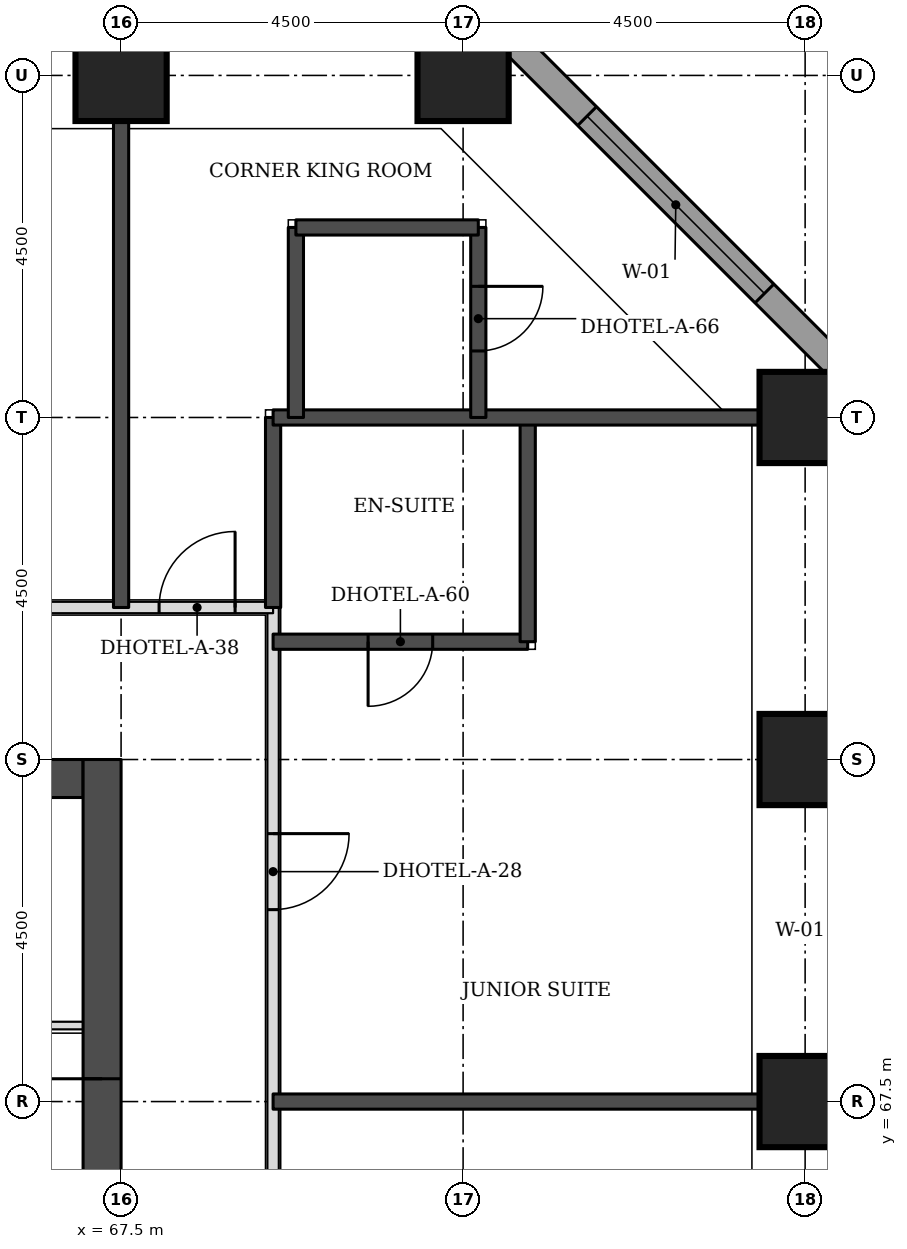
"""IFC4 building model, lengths in metres.
Left out: names, types, materials, properties, quantities, classifications, styles, units other than length and angle.
Written with IfcOpenShell. Run it as: python <this file> out.ifc"""

import sys

from ifc_helpers import new_model, si_unit, direction, frame, frame_2d, origin, origin_2d, place, context, subcontext, project, spatial, rectangle, extrude, element, fill, save


model = new_model("IFC4")
c1 = context("Model", 3, precision=1e-05, world=origin(), true_north=direction((0.0, 1.0)))
c2 = subcontext(c1, "Body", "Model", "MODEL_VIEW")
j1 = project(units=[si_unit("LENGTHUNIT", "METRE"), si_unit("PLANEANGLEUNIT", "RADIAN")], contexts=[c1])
p1 = place(None, origin())
s1 = spatial("IfcSite", under=j1, at=p1, CompositionType="ELEMENT")
p2 = place(p1, origin())
s2 = spatial("IfcBuilding", under=s1, at=p2, CompositionType="ELEMENT")
p3 = place(p2, frame((0.0, 0.0, 49.5)))
s3 = spatial("IfcBuildingStorey", under=s2, at=p3, CompositionType="ELEMENT", Elevation=49.5)
for number, where, z_axis, x_axis in (
    (1, (76.5, 67.5, 0.0), (0.0, 0.0, 1.0), (1.0, 0.0, 0.0)),
    (2, (76.5, 72.0, 0.0), (0.0, 0.0, 1.0), (1.0, 0.0, 0.0)),
    (3, (76.5, 76.5, 0.0), (0.0, 0.0, 1.0), (1.0, 0.0, 0.0)),
    (4, (67.5, 81.0, 0.0), (0.0, 0.0, 1.0), (1.0, 0.0, 0.0)),
    (5, (72.0, 81.0, 0.0), (0.0, 0.0, 1.0), (1.0, 0.0, 0.0)),
):
    element("IfcColumn", number, at=place(p3, frame(where, z_axis=z_axis, x_axis=x_axis)), inside=s3, PredefinedType="COLUMN", context=c2, shape_type="SweptSolid", body=[
        extrude(rectangle(XDim=1.2, YDim=1.2, at=origin_2d()), origin(), (0.0, 0.0, 1.0), 3.3),
    ])
p4 = place(p3, frame((45.5, 71.75, 0.0), z_axis=(0.0, 0.0, 1.0), x_axis=(1.0, 0.0, 0.0)))
e6 = element("IfcWall", 6, at=p4, inside=s3, PredefinedType="SHEAR", context=c2, shape_type="SweptSolid", body=[
    extrude(rectangle(XDim=21.5, YDim=0.5, at=frame_2d((10.75, 0.0))), origin(), (0.0, 0.0, 1.0), 3.3),
])
p5 = place(p3, frame((67.25, 49.5, 0.0), z_axis=(0.0, 0.0, 1.0), x_axis=(0.0, 1.0, 0.0)))
e7 = element("IfcWall", 7, at=p5, inside=s3, PredefinedType="SHEAR", context=c2, shape_type="SweptSolid", body=[
    extrude(rectangle(XDim=22.5, YDim=0.5, at=frame_2d((11.25, 0.0))), origin(), (0.0, 0.0, 1.0), 3.3),
])
p6 = place(p5, frame((4.2, 0.0, 0.0)))
e8 = element("IfcOpeningElement", 8, at=p6, cuts=e7, PredefinedType="OPENING", context=c2, shape_type="SweptSolid", body=[
    extrude(rectangle(XDim=1.8, YDim=2.1, at=frame_2d((0.9, 1.05))), frame((0.0, 0.26, 0.0), z_axis=(0.0, -1.0, 0.0), x_axis=(1.0, 0.0, 0.0)), (0.0, 0.0, 1.0), 0.52),
])
p7 = place(p5, frame((6.9, 0.0, 0.0)))
e9 = element("IfcOpeningElement", 9, at=p7, cuts=e7, PredefinedType="OPENING", context=c2, shape_type="SweptSolid", body=[
    extrude(rectangle(XDim=1.1, YDim=2.1, at=frame_2d((0.55, 1.05))), frame((0.0, 0.26, 0.0), z_axis=(0.0, -1.0, 0.0), x_axis=(1.0, 0.0, 0.0)), (0.0, 0.0, 1.0), 0.52),
])
p8 = place(p5, frame((13.6, 0.0, 0.0)))
e10 = element("IfcOpeningElement", 10, at=p8, cuts=e7, PredefinedType="OPENING", context=c2, shape_type="SweptSolid", body=[
    extrude(rectangle(XDim=1.1, YDim=2.1, at=frame_2d((0.55, 1.05))), frame((0.0, 0.26, 0.0), z_axis=(0.0, -1.0, 0.0), x_axis=(1.0, 0.0, 0.0)), (0.0, 0.0, 1.0), 0.52),
])
p9 = place(p5, frame((16.5, 0.0, 0.0)))
e11 = element("IfcOpeningElement", 11, at=p9, cuts=e7, PredefinedType="OPENING", context=c2, shape_type="SweptSolid", body=[
    extrude(rectangle(XDim=1.8, YDim=2.1, at=frame_2d((0.9, 1.05))), frame((0.0, 0.26, 0.0), z_axis=(0.0, -1.0, 0.0), x_axis=(1.0, 0.0, 0.0)), (0.0, 0.0, 1.0), 0.52),
])
p10 = place(p3, frame((77.326, 76.77, 0.0), z_axis=(0.0, 0.0, 1.0), x_axis=(-0.707106781187, 0.707106781187, 0.0)))
e12 = element("IfcWall", 12, at=p10, inside=s3, PredefinedType="STANDARD", context=c2, shape_type="SweptSolid", body=[
    extrude(rectangle(XDim=7.151, YDim=0.35, at=frame_2d((3.576, 0.0))), origin(), (0.0, 0.0, 1.0), 3.055),
])
p11 = place(p10, frame((1.926, 0.0, 0.8)))
e13 = element("IfcOpeningElement", 13, at=p11, cuts=e12, PredefinedType="OPENING", context=c2, shape_type="SweptSolid", body=[
    extrude(rectangle(XDim=3.3, YDim=1.5, at=frame_2d((1.65, 0.75))), frame((0.0, 0.185, 0.0), z_axis=(0.0, -1.0, 0.0), x_axis=(1.0, 0.0, 0.0)), (0.0, 0.0, 1.0), 0.37),
])
p12 = place(p3, frame((69.5, 47.5, 0.0), z_axis=(0.0, 0.0, 1.0), x_axis=(0.0, 1.0, 0.0)))
e14 = element("IfcWall", 14, at=p12, inside=s3, PredefinedType="PARTITIONING", context=c2, shape_type="SweptSolid", body=[
    extrude(rectangle(XDim=26.5, YDim=0.15, at=frame_2d((13.25, 0.0))), origin(), (0.0, 0.0, 1.0), 3.08),
])
p13 = place(p12, frame((22.525, 0.0, 0.0)))
e15 = element("IfcOpeningElement", 15, at=p13, cuts=e14, PredefinedType="OPENING", context=c2, shape_type="SweptSolid", body=[
    extrude(rectangle(XDim=1.0, YDim=2.1, at=frame_2d((0.5, 1.05))), frame((0.0, 0.085, 0.0), z_axis=(0.0, -1.0, 0.0), x_axis=(1.0, 0.0, 0.0)), (0.0, 0.0, 1.0), 0.17),
])
p14 = place(p12, frame((16.225, 0.0, 0.0)))
e16 = element("IfcOpeningElement", 16, at=p14, cuts=e14, PredefinedType="OPENING", context=c2, shape_type="SweptSolid", body=[
    extrude(rectangle(XDim=1.0, YDim=2.1, at=frame_2d((0.5, 1.05))), frame((0.0, 0.085, 0.0), z_axis=(0.0, -1.0, 0.0), x_axis=(1.0, 0.0, 0.0)), (0.0, 0.0, 1.0), 0.17),
])
p15 = place(p12, frame((4.25, 0.0, 0.0)))
e17 = element("IfcOpeningElement", 17, at=p15, cuts=e14, PredefinedType="OPENING", context=c2, shape_type="SweptSolid", body=[
    extrude(rectangle(XDim=1.1, YDim=2.1, at=frame_2d((0.55, 1.05))), frame((0.0, 0.085, 0.0), z_axis=(0.0, -1.0, 0.0), x_axis=(1.0, 0.0, 0.0)), (0.0, 0.0, 1.0), 0.17),
])
p16 = place(p12, frame((0.447, 0.0, 0.0)))
e18 = element("IfcOpeningElement", 18, at=p16, cuts=e14, PredefinedType="OPENING", context=c2, shape_type="SweptSolid", body=[
    extrude(rectangle(XDim=1.0, YDim=2.1, at=frame_2d((0.5, 1.05))), frame((0.0, 0.085, 0.0), z_axis=(0.0, -1.0, 0.0), x_axis=(1.0, 0.0, 0.0)), (0.0, 0.0, 1.0), 0.17),
])
p17 = place(p3, frame((43.0, 74.0, 0.0), z_axis=(0.0, 0.0, 1.0), x_axis=(1.0, 0.0, 0.0)))
e19 = element("IfcWall", 19, at=p17, inside=s3, PredefinedType="PARTITIONING", context=c2, shape_type="SweptSolid", body=[
    extrude(rectangle(XDim=26.5, YDim=0.15, at=frame_2d((13.25, 0.0))), origin(), (0.0, 0.0, 1.0), 3.08),
])
p18 = place(p17, frame((4.675, 0.0, 0.0)))
e20 = element("IfcOpeningElement", 20, at=p18, cuts=e19, PredefinedType="OPENING", context=c2, shape_type="SweptSolid", body=[
    extrude(rectangle(XDim=1.0, YDim=2.1, at=frame_2d((0.5, 1.05))), frame((0.0, 0.085, 0.0), z_axis=(0.0, -1.0, 0.0), x_axis=(1.0, 0.0, 0.0)), (0.0, 0.0, 1.0), 0.17),
])
p19 = place(p17, frame((9.025, 0.0, 0.0)))
e21 = element("IfcOpeningElement", 21, at=p19, cuts=e19, PredefinedType="OPENING", context=c2, shape_type="SweptSolid", body=[
    extrude(rectangle(XDim=1.0, YDim=2.1, at=frame_2d((0.5, 1.05))), frame((0.0, 0.085, 0.0), z_axis=(0.0, -1.0, 0.0), x_axis=(1.0, 0.0, 0.0)), (0.0, 0.0, 1.0), 0.17),
])
p20 = place(p17, frame((20.725, 0.0, 0.0)))
e22 = element("IfcOpeningElement", 22, at=p20, cuts=e19, PredefinedType="OPENING", context=c2, shape_type="SweptSolid", body=[
    extrude(rectangle(XDim=1.0, YDim=2.1, at=frame_2d((0.5, 1.05))), frame((0.0, 0.085, 0.0), z_axis=(0.0, -1.0, 0.0), x_axis=(1.0, 0.0, 0.0)), (0.0, 0.0, 1.0), 0.17),
])
p21 = place(p17, frame((0.5, 0.0, 0.0)))
e23 = element("IfcOpeningElement", 23, at=p21, cuts=e19, PredefinedType="OPENING", context=c2, shape_type="SweptSolid", body=[
    extrude(rectangle(XDim=1.0, YDim=2.1, at=frame_2d((0.5, 1.05))), frame((0.0, 0.085, 0.0), z_axis=(0.0, -1.0, 0.0), x_axis=(1.0, 0.0, 0.0)), (0.0, 0.0, 1.0), 0.17),
])
p22 = place(p17, frame((25.0, 0.0, 0.0)))
e24 = element("IfcOpeningElement", 24, at=p22, cuts=e19, PredefinedType="OPENING", context=c2, shape_type="SweptSolid", body=[
    extrude(rectangle(XDim=1.0, YDim=2.1, at=frame_2d((0.5, 1.05))), frame((0.0, 0.085, 0.0), z_axis=(0.0, -1.0, 0.0), x_axis=(1.0, 0.0, 0.0)), (0.0, 0.0, 1.0), 0.17),
])
p23 = place(p3, frame((69.5, 67.5, 0.0), z_axis=(0.0, 0.0, 1.0), x_axis=(1.0, 0.0, 0.0)))
e25 = element("IfcWall", 25, at=p23, inside=s3, PredefinedType="SOLIDWALL", context=c2, shape_type="SweptSolid", body=[
    extrude(rectangle(XDim=6.4, YDim=0.2, at=frame_2d((3.2, 0.0))), origin(), (0.0, 0.0, 1.0), 3.08),
])
p24 = place(p3, frame((69.5, 73.55, 0.0), z_axis=(0.0, 0.0, 1.0), x_axis=(1.0, 0.0, 0.0)))
e26 = element("IfcWall", 26, at=p24, inside=s3, PredefinedType="SOLIDWALL", context=c2, shape_type="SweptSolid", body=[
    extrude(rectangle(XDim=3.35, YDim=0.2, at=frame_2d((1.675, 0.0))), origin(), (0.0, 0.0, 1.0), 3.08),
])
p25 = place(p24, frame((1.25, 0.0, 0.0)))
e27 = element("IfcOpeningElement", 27, at=p25, cuts=e26, PredefinedType="OPENING", context=c2, shape_type="SweptSolid", body=[
    extrude(rectangle(XDim=0.85, YDim=2.1, at=frame_2d((0.425, 1.05))), frame((0.0, 0.11, 0.0), z_axis=(0.0, -1.0, 0.0), x_axis=(1.0, 0.0, 0.0)), (0.0, 0.0, 1.0), 0.22),
])
p26 = place(p3, frame((72.85, 73.55, 0.0), z_axis=(0.0, 0.0, 1.0), x_axis=(0.0, 1.0, 0.0)))
e28 = element("IfcWall", 28, at=p26, inside=s3, PredefinedType="SOLIDWALL", context=c2, shape_type="SweptSolid", body=[
    extrude(rectangle(XDim=2.95, YDim=0.2, at=frame_2d((1.475, 0.0))), origin(), (0.0, 0.0, 1.0), 3.08),
])
p27 = place(p3, frame((67.5, 74.0, 0.0), z_axis=(0.0, 0.0, 1.0), x_axis=(0.0, 1.0, 0.0)))
e29 = element("IfcWall", 29, at=p27, inside=s3, PredefinedType="SOLIDWALL", context=c2, shape_type="SweptSolid", body=[
    extrude(rectangle(XDim=6.4, YDim=0.2, at=frame_2d((3.2, 0.0))), origin(), (0.0, 0.0, 1.0), 3.08),
])
p28 = place(p3, frame((69.5, 74.0, 0.0), z_axis=(0.0, 0.0, 1.0), x_axis=(0.0, 1.0, 0.0)))
e30 = element("IfcWall", 30, at=p28, inside=s3, PredefinedType="SOLIDWALL", context=c2, shape_type="SweptSolid", body=[
    extrude(rectangle(XDim=2.5, YDim=0.2, at=frame_2d((1.25, 0.0))), origin(), (0.0, 0.0, 1.0), 3.08),
])
p29 = place(p3, frame((69.5, 76.5, 0.0), z_axis=(0.0, 0.0, 1.0), x_axis=(1.0, 0.0, 0.0)))
e31 = element("IfcWall", 31, at=p29, inside=s3, PredefinedType="SOLIDWALL", context=c2, shape_type="SweptSolid", body=[
    extrude(rectangle(XDim=6.4, YDim=0.2, at=frame_2d((3.2, 0.0))), origin(), (0.0, 0.0, 1.0), 3.08),
])
p30 = place(p3, frame((69.8, 76.5, 0.0), z_axis=(0.0, 0.0, 1.0), x_axis=(0.0, 1.0, 0.0)))
e32 = element("IfcWall", 32, at=p30, inside=s3, PredefinedType="SOLIDWALL", context=c2, shape_type="SweptSolid", body=[
    extrude(rectangle(XDim=2.5, YDim=0.2, at=frame_2d((1.25, 0.0))), origin(), (0.0, 0.0, 1.0), 3.08),
])
p31 = place(p3, frame((72.2, 76.5, 0.0), z_axis=(0.0, 0.0, 1.0), x_axis=(0.0, 1.0, 0.0)))
e33 = element("IfcWall", 33, at=p31, inside=s3, PredefinedType="SOLIDWALL", context=c2, shape_type="SweptSolid", body=[
    extrude(rectangle(XDim=2.5, YDim=0.2, at=frame_2d((1.25, 0.0))), origin(), (0.0, 0.0, 1.0), 3.08),
])
p32 = place(p31, frame((0.875, 0.0, 0.0)))
e34 = element("IfcOpeningElement", 34, at=p32, cuts=e33, PredefinedType="OPENING", context=c2, shape_type="SweptSolid", body=[
    extrude(rectangle(XDim=0.85, YDim=2.1, at=frame_2d((0.425, 1.05))), frame((0.0, 0.11, 0.0), z_axis=(0.0, -1.0, 0.0), x_axis=(1.0, 0.0, 0.0)), (0.0, 0.0, 1.0), 0.22),
])
p33 = place(p3, frame((69.8, 79.0, 0.0), z_axis=(0.0, 0.0, 1.0), x_axis=(1.0, 0.0, 0.0)))
e35 = element("IfcWall", 35, at=p33, inside=s3, PredefinedType="SOLIDWALL", context=c2, shape_type="SweptSolid", body=[
    extrude(rectangle(XDim=2.4, YDim=0.2, at=frame_2d((1.2, 0.0))), origin(), (0.0, 0.0, 1.0), 3.08),
])
p34 = place(p3, frame((61.85, 68.5, 0.0), z_axis=(0.0, 0.0, 1.0), x_axis=(1.0, 0.0, 0.0)))
e36 = element("IfcWall", 36, at=p34, inside=s3, PredefinedType="PARTITIONING", context=c2, shape_type="SweptSolid", body=[
    extrude(rectangle(XDim=5.15, YDim=0.1, at=frame_2d((2.575, 0.0))), origin(), (0.0, 0.0, 1.0), 3.08),
])
p35 = place(p34, frame((3.413, 0.0, 0.0)))
e37 = element("IfcOpeningElement", 37, at=p35, cuts=e36, PredefinedType="OPENING", context=c2, shape_type="SweptSolid", body=[
    extrude(rectangle(XDim=0.9, YDim=2.1, at=frame_2d((0.45, 1.05))), frame((0.0, 0.06, 0.0), z_axis=(0.0, -1.0, 0.0), x_axis=(1.0, 0.0, 0.0)), (0.0, 0.0, 1.0), 0.12),
])
p36 = place(p34, frame((0.837, 0.0, 0.0)))
e38 = element("IfcOpeningElement", 38, at=p36, cuts=e36, PredefinedType="OPENING", context=c2, shape_type="SweptSolid", body=[
    extrude(rectangle(XDim=0.9, YDim=2.1, at=frame_2d((0.45, 1.05))), frame((0.0, 0.06, 0.0), z_axis=(0.0, -1.0, 0.0), x_axis=(1.0, 0.0, 0.0)), (0.0, 0.0, 1.0), 0.12),
])
p37 = place(p11, origin())
e39 = element("IfcWindow", 39, at=p37, inside=s3, PartitioningType="SINGLE_PANEL", PredefinedType="WINDOW", context=c2, shape_type="SweptSolid", body=[
    extrude(rectangle(XDim=3.3, YDim=1.5, at=frame_2d((1.65, 0.75))), frame((0.0, 0.085, 0.0), z_axis=(0.0, -1.0, 0.0), x_axis=(1.0, 0.0, 0.0)), (0.0, 0.0, 1.0), 0.06),
])
fill(e13, e39)
p38 = place(p13, frame((1.0, 0.0, 0.0), z_axis=(0.0, 0.0, 1.0), x_axis=(-1.0, 0.0, 0.0)))
e40 = element("IfcDoor", 40, at=p38, inside=s3, OperationType="SINGLE_SWING_LEFT", PredefinedType="DOOR", context=c2, shape_type="SweptSolid", body=[
    extrude(rectangle(XDim=1.0, YDim=2.1, at=frame_2d((0.5, 1.05))), frame((0.0, 0.025, 0.0), z_axis=(0.0, -1.0, 0.0), x_axis=(1.0, 0.0, 0.0)), (0.0, 0.0, 1.0), 0.05),
])
fill(e15, e40)
p39 = place(p25, frame((0.85, 0.0, 0.0), z_axis=(0.0, 0.0, 1.0), x_axis=(-1.0, 0.0, 0.0)))
e41 = element("IfcDoor", 41, at=p39, inside=s3, OperationType="SINGLE_SWING_RIGHT", PredefinedType="DOOR", context=c2, shape_type="SweptSolid", body=[
    extrude(rectangle(XDim=0.85, YDim=2.1, at=frame_2d((0.425, 1.05))), frame((0.0, 0.025, 0.0), z_axis=(0.0, -1.0, 0.0), x_axis=(1.0, 0.0, 0.0)), (0.0, 0.0, 1.0), 0.05),
])
fill(e27, e41)
p40 = place(p22, origin())
e42 = element("IfcDoor", 42, at=p40, inside=s3, OperationType="SINGLE_SWING_RIGHT", PredefinedType="DOOR", context=c2, shape_type="SweptSolid", body=[
    extrude(rectangle(XDim=1.0, YDim=2.1, at=frame_2d((0.5, 1.05))), frame((0.0, 0.025, 0.0), z_axis=(0.0, -1.0, 0.0), x_axis=(1.0, 0.0, 0.0)), (0.0, 0.0, 1.0), 0.05),
])
fill(e24, e42)
p41 = place(p32, frame((0.85, 0.0, 0.0), z_axis=(0.0, 0.0, 1.0), x_axis=(-1.0, 0.0, 0.0)))
e43 = element("IfcDoor", 43, at=p41, inside=s3, OperationType="SINGLE_SWING_LEFT", PredefinedType="DOOR", context=c2, shape_type="SweptSolid", body=[
    extrude(rectangle(XDim=0.85, YDim=2.1, at=frame_2d((0.425, 1.05))), frame((0.0, 0.025, 0.0), z_axis=(0.0, -1.0, 0.0), x_axis=(1.0, 0.0, 0.0)), (0.0, 0.0, 1.0), 0.05),
])
fill(e34, e43)
p42 = place(p9, origin())
e44 = element("IfcDoor", 44, at=p42, inside=s3, OperationType="SINGLE_SWING_RIGHT", PredefinedType="DOOR", context=c2, shape_type="SweptSolid", body=[
    extrude(rectangle(XDim=1.8, YDim=2.1, at=frame_2d((0.9, 1.05))), frame((0.0, 0.025, 0.0), z_axis=(0.0, -1.0, 0.0), x_axis=(1.0, 0.0, 0.0)), (0.0, 0.0, 1.0), 0.05),
])
fill(e11, e44)
save(model, sys.argv[1])
